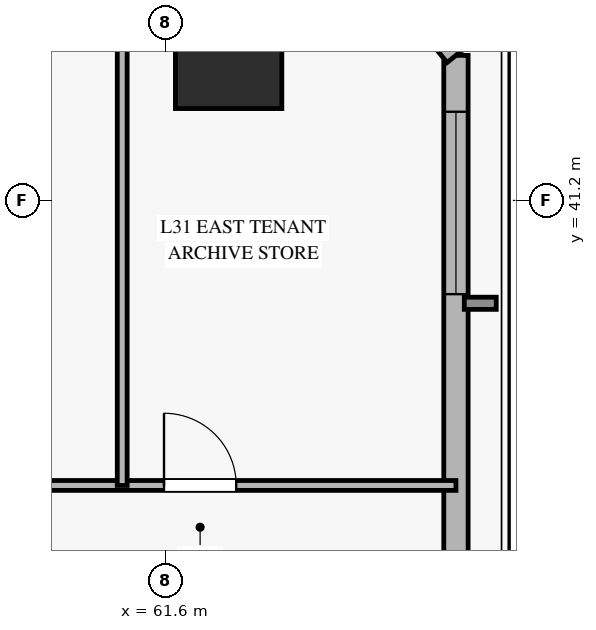
"""IFC4 building model, lengths in metres.
Left out: names, types, materials, properties, quantities, classifications, styles, units other than length and angle.
Written with IfcOpenShell. Run it as: python <this file> out.ifc"""

import sys

from ifc_helpers import new_model, si_unit, direction, frame, frame_2d, origin, origin_2d, place, context, subcontext, project, spatial, rectangle, hollow_rectangle, extrude, source, transform, mapped, element, fill, save


model = new_model("IFC4")
c1 = context("Model", 3, precision=1e-05, world=origin(), true_north=direction((0.0, 1.0)))
c2 = subcontext(c1, "Body", "Model", "MODEL_VIEW")
j1 = project(units=[si_unit("LENGTHUNIT", "METRE"), si_unit("PLANEANGLEUNIT", "RADIAN")], contexts=[c1])
p1 = place(None, origin())
s1 = spatial("IfcSite", under=j1, at=p1, CompositionType="ELEMENT")
p2 = place(p1, origin())
s2 = spatial("IfcBuilding", under=s1, at=p2, CompositionType="ELEMENT")
p3 = place(p2, frame((0.0, 0.0, 127.0)))
s3 = spatial("IfcBuildingStorey", under=s2, at=p3, CompositionType="ELEMENT", Elevation=127.0)
m1 = source(origin(), c2, "Body", "SweptSolid", [
    extrude(hollow_rectangle(XDim=1.4, YDim=1.4, WallThickness=0.065, at=origin_2d()), origin(), (0.0, 0.0, 1.0), 3.64),
])
p4 = place(p3, frame((62.43, 43.109, 0.0), z_axis=(0.0, 0.0, 1.0), x_axis=(1.0, 0.0, 0.0)))
e1 = element("IfcColumn", 1, at=p4, inside=s3, PredefinedType="COLUMN", context=c2, shape_type="MappedRepresentation", body=[
    mapped(m1, transform((0.0, 0.0, 0.0), x_axis=(1.0, 0.0, 0.0), y_axis=(0.0, 1.0, 0.0), z_axis=(0.0, 0.0, 1.0), scale=1.0)),
])
p5 = place(p3, frame((65.421, 27.259, 0.0), z_axis=(0.0, 0.0, 1.0), x_axis=(0.0, 1.0, 0.0)))
e2 = element("IfcWall", 2, at=p5, inside=s3, PredefinedType="SOLIDWALL", context=c2, shape_type="SweptSolid", body=[
    extrude(rectangle(XDim=15.85, YDim=0.32, at=frame_2d((7.925, 0.0))), origin(), (0.0, 0.0, 1.0), 3.12),
])
p6 = place(p5, frame((2.241, 0.0, 0.45)))
e3 = element("IfcOpeningElement", 3, at=p6, cuts=e2, PredefinedType="OPENING", context=c2, shape_type="SweptSolid", body=[
    extrude(rectangle(XDim=2.4, YDim=2.1, at=frame_2d((1.2, 1.05))), frame((0.0, 0.17, 0.0), z_axis=(0.0, -1.0, 0.0), x_axis=(1.0, 0.0, 0.0)), (0.0, 0.0, 1.0), 0.34),
])
p7 = place(p5, frame((12.708, 0.0, 0.45)))
e4 = element("IfcOpeningElement", 4, at=p7, cuts=e2, PredefinedType="OPENING", context=c2, shape_type="SweptSolid", body=[
    extrude(rectangle(XDim=2.4, YDim=2.1, at=frame_2d((1.2, 1.05))), frame((0.0, 0.17, 0.0), z_axis=(0.0, -1.0, 0.0), x_axis=(1.0, 0.0, 0.0)), (0.0, 0.0, 1.0), 0.34),
])
p8 = place(p3, frame((65.421, 43.109, 0.0), z_axis=(0.0, 0.0, 1.0), x_axis=(-0.62893048879, 0.7774615362, 0.0)))
e5 = element("IfcWall", 5, at=p8, inside=s3, PredefinedType="SOLIDWALL", context=c2, shape_type="SweptSolid", body=[
    extrude(rectangle(XDim=4.04, YDim=0.3, at=frame_2d((2.02, 0.0))), origin(), (0.0, 0.0, 1.0), 3.12),
])
p9 = place(p8, frame((1.22, 0.0, 0.45)))
e6 = element("IfcOpeningElement", 6, at=p9, cuts=e5, PredefinedType="OPENING", context=c2, shape_type="SweptSolid", body=[
    extrude(rectangle(XDim=1.6, YDim=2.0, at=frame_2d((0.8, 1.0))), frame((0.0, 0.16, 0.0), z_axis=(0.0, -1.0, 0.0), x_axis=(1.0, 0.0, 0.0)), (0.0, 0.0, 1.0), 0.32),
])
p10 = place(p3, frame((51.15, 37.45, 0.0), z_axis=(0.0, 0.0, 1.0), x_axis=(1.0, 0.0, 0.0)))
e7 = element("IfcWall", 7, at=p10, inside=s3, PredefinedType="PARTITIONING", context=c2, shape_type="SweptSolid", body=[
    extrude(rectangle(XDim=14.271, YDim=0.13, at=frame_2d((7.135, 0.0))), origin(), (0.0, 0.0, 1.0), 3.125),
])
p11 = place(p10, frame((0.5, 0.0, 0.0)))
e8 = element("IfcOpeningElement", 8, at=p11, cuts=e7, PredefinedType="OPENING", context=c2, shape_type="SweptSolid", body=[
    extrude(rectangle(XDim=0.9, YDim=2.1, at=frame_2d((0.45, 1.05))), frame((0.0, 0.075, 0.0), z_axis=(0.0, -1.0, 0.0), x_axis=(1.0, 0.0, 0.0)), (0.0, 0.0, 1.0), 0.15),
])
p12 = place(p10, frame((10.43, 0.0, 0.0)))
e9 = element("IfcOpeningElement", 9, at=p12, cuts=e7, PredefinedType="OPENING", context=c2, shape_type="SweptSolid", body=[
    extrude(rectangle(XDim=0.95, YDim=2.1, at=frame_2d((0.475, 1.05))), frame((0.0, 0.075, 0.0), z_axis=(0.0, -1.0, 0.0), x_axis=(1.0, 0.0, 0.0)), (0.0, 0.0, 1.0), 0.15),
])
p13 = place(p3, frame((61.03, 37.45, 0.0), z_axis=(0.0, 0.0, 1.0), x_axis=(0.0, 1.0, 0.0)))
e10 = element("IfcWall", 10, at=p13, inside=s3, PredefinedType="PARTITIONING", context=c2, shape_type="SweptSolid", body=[
    extrude(rectangle(XDim=8.8, YDim=0.13, at=frame_2d((4.4, 0.0))), origin(), (0.0, 0.0, 1.0), 3.64),
])
m2 = source(origin(), c2, "Body", "SweptSolid", [
    extrude(rectangle(XDim=2.4, YDim=2.1, at=frame_2d((1.2, 1.05))), frame((0.0, 0.03, 0.0), z_axis=(0.0, -1.0, 0.0), x_axis=(1.0, 0.0, 0.0)), (0.0, 0.0, 1.0), 0.06),
])
p14 = place(p7, origin())
e11 = element("IfcWindow", 11, at=p14, inside=s3, PartitioningType="SINGLE_PANEL", PredefinedType="WINDOW", context=c2, shape_type="MappedRepresentation", body=[
    mapped(m2, transform((0.0, 0.0, 0.0), x_axis=(1.0, 0.0, 0.0), y_axis=(0.0, 1.0, 0.0), z_axis=(0.0, 0.0, 1.0), scale=1.0)),
])
fill(e4, e11)
m3 = source(origin(), c2, "Body", "SweptSolid", [
    extrude(rectangle(XDim=0.95, YDim=2.1, at=frame_2d((0.475, 1.05))), frame((0.0, 0.025, 0.0), z_axis=(0.0, -1.0, 0.0), x_axis=(1.0, 0.0, 0.0)), (0.0, 0.0, 1.0), 0.05),
])
p15 = place(p12, origin())
e12 = element("IfcDoor", 12, at=p15, inside=s3, OperationType="SINGLE_SWING_LEFT", PredefinedType="DOOR", context=c2, shape_type="MappedRepresentation", body=[
    mapped(m3, transform((0.0, 0.0, 0.0), x_axis=(1.0, 0.0, 0.0), y_axis=(0.0, 1.0, 0.0), z_axis=(0.0, 0.0, 1.0), scale=1.0)),
])
fill(e9, e12)
save(model, sys.argv[1])
